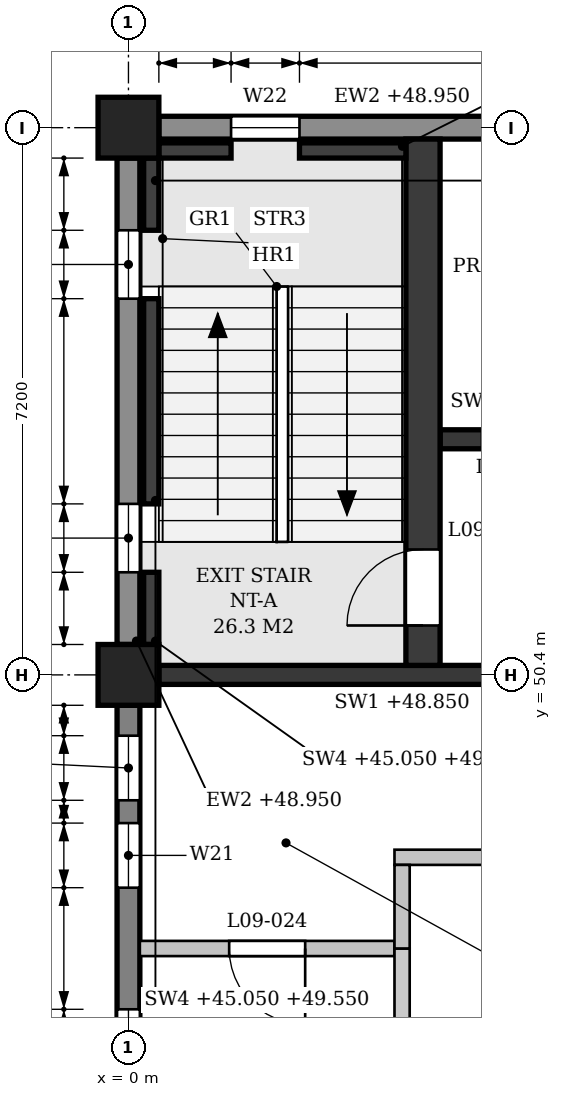
"""IFC4 building model, lengths in metres.
Left out: names, types, materials, properties, quantities, classifications, styles, units other than length and angle.
Written with IfcOpenShell. Run it as: python <this file> out.ifc"""

import sys

from ifc_helpers import new_model, si_unit, direction, frame, frame_2d, origin, origin_2d, place, context, subcontext, project, spatial, polyline, rectangle, outline, extrude, element, fill, save


model = new_model("IFC4")
c1 = context("Model", 3, precision=1e-05, world=origin(), true_north=direction((0.0, 1.0)))
c2 = subcontext(c1, "Body", "Model", "MODEL_VIEW")
j1 = project(units=[si_unit("LENGTHUNIT", "METRE"), si_unit("PLANEANGLEUNIT", "RADIAN")], contexts=[c1])
p1 = place(None, origin())
s1 = spatial("IfcSite", under=j1, at=p1, CompositionType="ELEMENT")
p2 = place(p1, origin())
s2 = spatial("IfcBuilding", under=s1, at=p2, CompositionType="ELEMENT")
p3 = place(p2, frame((0.0, 0.0, 45.3)))
s3 = spatial("IfcBuildingStorey", under=s2, at=p3, CompositionType="ELEMENT", Elevation=45.3)
for number, where, z_axis, x_axis in (
    (1, (0.0, 50.4, 0.0), (0.0, 0.0, 1.0), (1.0, 0.0, 0.0)),
    (2, (0.0, 57.6, 0.0), (0.0, 0.0, 1.0), (1.0, 0.0, 0.0)),
):
    element("IfcColumn", number, at=place(p3, frame(where, z_axis=z_axis, x_axis=x_axis)), inside=s3, PredefinedType="COLUMN", context=c2, shape_type="SweptSolid", body=[
        extrude(rectangle(XDim=0.8, YDim=0.8, at=origin_2d()), origin(), (0.0, 0.0, 1.0), 4.5),
    ])
p4 = place(p3, frame((0.0, 43.6, 0.0), z_axis=(0.0, 0.0, 1.0), x_axis=(0.0, 1.0, 0.0)))
e3 = element("IfcWall", 3, at=p4, inside=s3, PredefinedType="STANDARD", context=c2, shape_type="SweptSolid", body=[
    extrude(rectangle(XDim=6.4, YDim=0.3, at=frame_2d((3.2, 0.0))), origin(), (0.0, 0.0, 1.0), 3.65),
])
p5 = place(p4, frame((0.4, 0.0, 0.9)))
e4 = element("IfcOpeningElement", 4, at=p5, cuts=e3, PredefinedType="OPENING", context=c2, shape_type="SweptSolid", body=[
    extrude(outline(polyline([(0.0, 0.0), (0.85, 0.0), (0.85, 2.25), (0.425, 2.7), (0.0, 2.25), (0.0, 0.0)])), frame((0.0, 0.16, 0.0), z_axis=(0.0, -1.0, 0.0), x_axis=(1.0, 0.0, 0.0)), (0.0, 0.0, 1.0), 0.32),
])
p6 = place(p4, frame((1.55, 0.0, 0.9)))
e5 = element("IfcOpeningElement", 5, at=p6, cuts=e3, PredefinedType="OPENING", context=c2, shape_type="SweptSolid", body=[
    extrude(outline(polyline([(0.0, 0.0), (0.85, 0.0), (0.85, 2.25), (0.425, 2.7), (0.0, 2.25), (0.0, 0.0)])), frame((0.0, 0.16, 0.0), z_axis=(0.0, -1.0, 0.0), x_axis=(1.0, 0.0, 0.0)), (0.0, 0.0, 1.0), 0.32),
])
p7 = place(p4, frame((4.0, 0.0, 0.9)))
e6 = element("IfcOpeningElement", 6, at=p7, cuts=e3, PredefinedType="OPENING", context=c2, shape_type="SweptSolid", body=[
    extrude(outline(polyline([(0.0, 0.0), (0.85, 0.0), (0.85, 2.25), (0.425, 2.7), (0.0, 2.25), (0.0, 0.0)])), frame((0.0, 0.16, 0.0), z_axis=(0.0, -1.0, 0.0), x_axis=(1.0, 0.0, 0.0)), (0.0, 0.0, 1.0), 0.32),
])
p8 = place(p4, frame((5.15, 0.0, 0.9)))
e7 = element("IfcOpeningElement", 7, at=p8, cuts=e3, PredefinedType="OPENING", context=c2, shape_type="SweptSolid", body=[
    extrude(outline(polyline([(0.0, 0.0), (0.85, 0.0), (0.85, 2.25), (0.425, 2.7), (0.0, 2.25), (0.0, 0.0)])), frame((0.0, 0.16, 0.0), z_axis=(0.0, -1.0, 0.0), x_axis=(1.0, 0.0, 0.0)), (0.0, 0.0, 1.0), 0.32),
])
p9 = place(p3, frame((0.0, 50.8, 0.0), z_axis=(0.0, 0.0, 1.0), x_axis=(0.0, 1.0, 0.0)))
e8 = element("IfcWall", 8, at=p9, inside=s3, PredefinedType="STANDARD", context=c2, shape_type="SweptSolid", body=[
    extrude(rectangle(XDim=6.4, YDim=0.3, at=frame_2d((3.2, 0.0))), origin(), (0.0, 0.0, 1.0), 3.65),
])
p10 = place(p9, frame((0.95, 0.0, 0.9)))
e9 = element("IfcOpeningElement", 9, at=p10, cuts=e8, PredefinedType="OPENING", context=c2, shape_type="SweptSolid", body=[
    extrude(outline(polyline([(0.0, 0.0), (0.9, 0.0), (0.9, 2.25), (0.45, 2.7), (0.0, 2.25), (0.0, 0.0)])), frame((0.0, 0.16, 0.0), z_axis=(0.0, -1.0, 0.0), x_axis=(1.0, 0.0, 0.0)), (0.0, 0.0, 1.0), 0.32),
])
p11 = place(p9, frame((4.55, 0.0, 0.9)))
e10 = element("IfcOpeningElement", 10, at=p11, cuts=e8, PredefinedType="OPENING", context=c2, shape_type="SweptSolid", body=[
    extrude(outline(polyline([(0.0, 0.0), (0.9, 0.0), (0.9, 2.25), (0.45, 2.7), (0.0, 2.25), (0.0, 0.0)])), frame((0.0, 0.16, 0.0), z_axis=(0.0, -1.0, 0.0), x_axis=(1.0, 0.0, 0.0)), (0.0, 0.0, 1.0), 0.32),
])
p12 = place(p3, frame((6.8, 57.6, 0.0), z_axis=(0.0, 0.0, 1.0), x_axis=(-1.0, 0.0, 0.0)))
e11 = element("IfcWall", 11, at=p12, inside=s3, PredefinedType="STANDARD", context=c2, shape_type="SweptSolid", body=[
    extrude(rectangle(XDim=6.4, YDim=0.3, at=frame_2d((3.2, 0.0))), origin(), (0.0, 0.0, 1.0), 3.65),
])
p13 = place(p12, frame((4.55, 0.0, 0.9)))
e12 = element("IfcOpeningElement", 12, at=p13, cuts=e11, PredefinedType="OPENING", context=c2, shape_type="SweptSolid", body=[
    extrude(outline(polyline([(0.0, 0.0), (0.9, 0.0), (0.9, 2.25), (0.45, 2.7), (0.0, 2.25), (0.0, 0.0)])), frame((0.0, 0.16, 0.0), z_axis=(0.0, -1.0, 0.0), x_axis=(1.0, 0.0, 0.0)), (0.0, 0.0, 1.0), 0.32),
])
p14 = place(p3, frame((0.4, 50.4, 0.0), z_axis=(0.0, 0.0, 1.0), x_axis=(1.0, 0.0, 0.0)))
e13 = element("IfcWall", 13, at=p14, inside=s3, PredefinedType="SHEAR", context=c2, shape_type="SweptSolid", body=[
    extrude(rectangle(XDim=6.4, YDim=0.25, at=frame_2d((3.2, 0.0))), origin(), (0.0, 0.0, 1.0), 3.55),
])
p15 = place(p14, frame((4.85, 0.0, 0.0)))
e14 = element("IfcOpeningElement", 14, at=p15, cuts=e13, PredefinedType="OPENING", context=c2, shape_type="SweptSolid", body=[
    extrude(rectangle(XDim=1.1, YDim=2.1, at=frame_2d((0.55, 1.05))), frame((0.0, 0.135, 0.0), z_axis=(0.0, -1.0, 0.0), x_axis=(1.0, 0.0, 0.0)), (0.0, 0.0, 1.0), 0.27),
])
p16 = place(p3, frame((0.3, 50.8, -0.25), z_axis=(0.0, 0.0, 1.0), x_axis=(0.0, 1.0, 0.0)))
e15 = element("IfcWall", 15, at=p16, inside=s3, PredefinedType="SHEAR", context=c2, shape_type="SweptSolid", body=[
    extrude(rectangle(XDim=0.95, YDim=0.2, at=frame_2d((0.475, 0.0))), origin(), (0.0, 0.0, 1.0), 4.5),
])
p17 = place(p3, frame((0.3, 52.65, -0.25), z_axis=(0.0, 0.0, 1.0), x_axis=(0.0, 1.0, 0.0)))
e16 = element("IfcWall", 16, at=p17, inside=s3, PredefinedType="SHEAR", context=c2, shape_type="SweptSolid", body=[
    extrude(rectangle(XDim=2.7, YDim=0.2, at=frame_2d((1.35, 0.0))), origin(), (0.0, 0.0, 1.0), 4.5),
])
p18 = place(p3, frame((0.3, 56.25, -0.25), z_axis=(0.0, 0.0, 1.0), x_axis=(0.0, 1.0, 0.0)))
e17 = element("IfcWall", 17, at=p18, inside=s3, PredefinedType="SHEAR", context=c2, shape_type="SweptSolid", body=[
    extrude(rectangle(XDim=0.95, YDim=0.2, at=frame_2d((0.475, 0.0))), origin(), (0.0, 0.0, 1.0), 4.5),
])
p19 = place(p3, frame((0.4, 57.3, -0.25), z_axis=(0.0, 0.0, 1.0), x_axis=(1.0, 0.0, 0.0)))
e18 = element("IfcWall", 18, at=p19, inside=s3, PredefinedType="SHEAR", context=c2, shape_type="SweptSolid", body=[
    extrude(rectangle(XDim=0.95, YDim=0.2, at=frame_2d((0.475, 0.0))), origin(), (0.0, 0.0, 1.0), 4.5),
])
p20 = place(p3, frame((2.25, 57.3, -0.25), z_axis=(0.0, 0.0, 1.0), x_axis=(1.0, 0.0, 0.0)))
e19 = element("IfcWall", 19, at=p20, inside=s3, PredefinedType="SHEAR", context=c2, shape_type="SweptSolid", body=[
    extrude(rectangle(XDim=1.4, YDim=0.2, at=frame_2d((0.7, 0.0))), origin(), (0.0, 0.0, 1.0), 4.5),
])
p21 = place(p3, frame((3.875, 50.525, 0.0), z_axis=(0.0, 0.0, 1.0), x_axis=(0.0, 1.0, 0.0)))
e20 = element("IfcWall", 20, at=p21, inside=s3, PredefinedType="SHEAR", context=c2, shape_type="SweptSolid", body=[
    extrude(rectangle(XDim=6.925, YDim=0.45, at=frame_2d((3.462, 0.0))), origin(), (0.0, 0.0, 1.0), 4.25),
])
p22 = place(p21, frame((0.525, 0.0, 0.0)))
e21 = element("IfcOpeningElement", 21, at=p22, cuts=e20, PredefinedType="OPENING", context=c2, shape_type="SweptSolid", body=[
    extrude(rectangle(XDim=1.0, YDim=2.1, at=frame_2d((0.5, 1.05))), frame((0.0, 0.235, 0.0), z_axis=(0.0, -1.0, 0.0), x_axis=(1.0, 0.0, 0.0)), (0.0, 0.0, 1.0), 0.47),
])
p23 = place(p3, frame((4.1, 53.5, 0.0), z_axis=(0.0, 0.0, 1.0), x_axis=(1.0, 0.0, 0.0)))
e22 = element("IfcWall", 22, at=p23, inside=s3, PredefinedType="SHEAR", context=c2, shape_type="SweptSolid", body=[
    extrude(rectangle(XDim=2.975, YDim=0.25, at=frame_2d((1.487, 0.0))), origin(), (0.0, 0.0, 1.0), 4.25),
])
p24 = place(p23, frame((0.55, 0.0, 0.0)))
e23 = element("IfcOpeningElement", 23, at=p24, cuts=e22, PredefinedType="OPENING", context=c2, shape_type="SweptSolid", body=[
    extrude(rectangle(XDim=0.9, YDim=2.1, at=frame_2d((0.45, 1.05))), frame((0.0, 0.135, 0.0), z_axis=(0.0, -1.0, 0.0), x_axis=(1.0, 0.0, 0.0)), (0.0, 0.0, 1.0), 0.27),
])
p25 = place(p3, frame((0.15, 46.8, 0.0), z_axis=(0.0, 0.0, 1.0), x_axis=(1.0, 0.0, 0.0)))
e24 = element("IfcWall", 24, at=p25, inside=s3, PredefinedType="PARTITIONING", context=c2, shape_type="SweptSolid", body=[
    extrude(outline(polyline([(0.0, 0.0), (3.35, 0.0), (3.35, 4.25), (0.05, 4.25), (0.05, 3.65), (0.0, 3.65), (0.0, 0.0)])), frame((0.0, 0.1, 0.0), z_axis=(0.0, -1.0, 0.0), x_axis=(1.0, 0.0, 0.0)), (0.0, 0.0, 1.0), 0.2),
])
p26 = place(p25, frame((1.175, 0.0, 0.0)))
e25 = element("IfcOpeningElement", 25, at=p26, cuts=e24, PredefinedType="OPENING", context=c2, shape_type="SweptSolid", body=[
    extrude(rectangle(XDim=1.0, YDim=2.1, at=frame_2d((0.5, 1.05))), frame((0.0, 0.11, 0.0), z_axis=(0.0, -1.0, 0.0), x_axis=(1.0, 0.0, 0.0)), (0.0, 0.0, 1.0), 0.22),
])
p27 = place(p3, frame((3.5, 48.0, 0.0), z_axis=(0.0, 0.0, 1.0), x_axis=(1.0, 0.0, 0.0)))
e26 = element("IfcWall", 26, at=p27, inside=s3, PredefinedType="PARTITIONING", context=c2, shape_type="SweptSolid", body=[
    extrude(outline(polyline([(0.0, 0.0), (14.6, 0.0), (14.6, 4.25), (11.125, 4.25), (11.125, 3.55), (10.675, 3.55), (10.675, 4.25), (3.925, 4.25), (3.925, 3.55), (3.475, 3.55), (3.475, 4.25), (0.0, 4.25), (0.0, 0.0)])), frame((0.0, 0.1, 0.0), z_axis=(0.0, -1.0, 0.0), x_axis=(1.0, 0.0, 0.0)), (0.0, 0.0, 1.0), 0.2),
])
p28 = place(p27, frame((1.4, 0.0, 0.0)))
e27 = element("IfcOpeningElement", 27, at=p28, cuts=e26, PredefinedType="OPENING", context=c2, shape_type="SweptSolid", body=[
    extrude(rectangle(XDim=1.0, YDim=2.1, at=frame_2d((0.5, 1.05))), frame((0.0, 0.11, 0.0), z_axis=(0.0, -1.0, 0.0), x_axis=(1.0, 0.0, 0.0)), (0.0, 0.0, 1.0), 0.22),
])
p29 = place(p27, frame((5.0, 0.0, 0.0)))
e28 = element("IfcOpeningElement", 28, at=p29, cuts=e26, PredefinedType="OPENING", context=c2, shape_type="SweptSolid", body=[
    extrude(rectangle(XDim=1.0, YDim=2.1, at=frame_2d((0.5, 1.05))), frame((0.0, 0.11, 0.0), z_axis=(0.0, -1.0, 0.0), x_axis=(1.0, 0.0, 0.0)), (0.0, 0.0, 1.0), 0.22),
])
p30 = place(p3, frame((3.6, 36.15, 0.0), z_axis=(0.0, 0.0, 1.0), x_axis=(0.0, 1.0, 0.0)))
e29 = element("IfcWall", 29, at=p30, inside=s3, PredefinedType="PARTITIONING", context=c2, shape_type="SweptSolid", body=[
    extrude(outline(polyline([(0.0, 0.0), (10.65, 0.0), (10.65, 4.25), (7.275, 4.25), (7.275, 3.55), (6.825, 3.55), (6.825, 4.25), (0.05, 4.25), (0.05, 3.65), (0.0, 3.65), (0.0, 0.0)])), frame((0.0, 0.1, 0.0), z_axis=(0.0, -1.0, 0.0), x_axis=(1.0, 0.0, 0.0)), (0.0, 0.0, 1.0), 0.2),
])
p31 = place(p3, frame((3.6, 46.8, 0.0), z_axis=(0.0, 0.0, 1.0), x_axis=(0.0, 1.0, 0.0)))
e30 = element("IfcWall", 30, at=p31, inside=s3, PredefinedType="PARTITIONING", context=c2, shape_type="SweptSolid", body=[
    extrude(rectangle(XDim=1.1, YDim=0.2, at=frame_2d((0.55, 0.0))), origin(), (0.0, 0.0, 1.0), 4.25),
])
p32 = place(p13, origin())
e31 = element("IfcWindow", 31, at=p32, inside=s3, PartitioningType="SINGLE_PANEL", PredefinedType="WINDOW", context=c2, shape_type="SweptSolid", body=[
    extrude(outline(polyline([(0.0, 0.0), (0.9, 0.0), (0.9, 2.25), (0.45, 2.7), (0.0, 2.25), (0.0, 0.0)])), frame((0.0, 0.03, 0.0), z_axis=(0.0, -1.0, 0.0), x_axis=(1.0, 0.0, 0.0)), (0.0, 0.0, 1.0), 0.06),
])
fill(e12, e31)
p33 = place(p6, origin())
e32 = element("IfcWindow", 32, at=p33, inside=s3, PartitioningType="SINGLE_PANEL", PredefinedType="WINDOW", context=c2, shape_type="SweptSolid", body=[
    extrude(outline(polyline([(0.0, 0.0), (0.85, 0.0), (0.85, 2.25), (0.425, 2.7), (0.0, 2.25), (0.0, 0.0)])), frame((0.0, 0.03, 0.0), z_axis=(0.0, -1.0, 0.0), x_axis=(1.0, 0.0, 0.0)), (0.0, 0.0, 1.0), 0.06),
])
fill(e5, e32)
p34 = place(p7, origin())
e33 = element("IfcWindow", 33, at=p34, inside=s3, PartitioningType="SINGLE_PANEL", PredefinedType="WINDOW", context=c2, shape_type="SweptSolid", body=[
    extrude(outline(polyline([(0.0, 0.0), (0.85, 0.0), (0.85, 2.25), (0.425, 2.7), (0.0, 2.25), (0.0, 0.0)])), frame((0.0, 0.03, 0.0), z_axis=(0.0, -1.0, 0.0), x_axis=(1.0, 0.0, 0.0)), (0.0, 0.0, 1.0), 0.06),
])
fill(e6, e33)
p35 = place(p8, origin())
e34 = element("IfcWindow", 34, at=p35, inside=s3, PartitioningType="SINGLE_PANEL", PredefinedType="WINDOW", context=c2, shape_type="SweptSolid", body=[
    extrude(outline(polyline([(0.0, 0.0), (0.85, 0.0), (0.85, 2.25), (0.425, 2.7), (0.0, 2.25), (0.0, 0.0)])), frame((0.0, 0.03, 0.0), z_axis=(0.0, -1.0, 0.0), x_axis=(1.0, 0.0, 0.0)), (0.0, 0.0, 1.0), 0.06),
])
fill(e7, e34)
p36 = place(p10, origin())
e35 = element("IfcWindow", 35, at=p36, inside=s3, PartitioningType="SINGLE_PANEL", PredefinedType="WINDOW", context=c2, shape_type="SweptSolid", body=[
    extrude(outline(polyline([(0.0, 0.0), (0.9, 0.0), (0.9, 2.25), (0.45, 2.7), (0.0, 2.25), (0.0, 0.0)])), frame((0.0, 0.03, 0.0), z_axis=(0.0, -1.0, 0.0), x_axis=(1.0, 0.0, 0.0)), (0.0, 0.0, 1.0), 0.06),
])
fill(e9, e35)
p37 = place(p11, origin())
e36 = element("IfcWindow", 36, at=p37, inside=s3, PartitioningType="SINGLE_PANEL", PredefinedType="WINDOW", context=c2, shape_type="SweptSolid", body=[
    extrude(outline(polyline([(0.0, 0.0), (0.9, 0.0), (0.9, 2.25), (0.45, 2.7), (0.0, 2.25), (0.0, 0.0)])), frame((0.0, 0.03, 0.0), z_axis=(0.0, -1.0, 0.0), x_axis=(1.0, 0.0, 0.0)), (0.0, 0.0, 1.0), 0.06),
])
fill(e10, e36)
p38 = place(p22, origin())
e37 = element("IfcDoor", 37, at=p38, inside=s3, OperationType="SINGLE_SWING_LEFT", PredefinedType="DOOR", context=c2, shape_type="SweptSolid", body=[
    extrude(rectangle(XDim=1.0, YDim=2.1, at=frame_2d((0.5, 1.05))), frame((0.0, 0.025, 0.0), z_axis=(0.0, -1.0, 0.0), x_axis=(1.0, 0.0, 0.0)), (0.0, 0.0, 1.0), 0.05),
])
fill(e21, e37)
p39 = place(p26, frame((1.0, 0.0, 0.0), z_axis=(0.0, 0.0, 1.0), x_axis=(-1.0, 0.0, 0.0)))
e38 = element("IfcDoor", 38, at=p39, inside=s3, OperationType="SINGLE_SWING_LEFT", PredefinedType="DOOR", context=c2, shape_type="SweptSolid", body=[
    extrude(rectangle(XDim=1.0, YDim=2.1, at=frame_2d((0.5, 1.05))), frame((0.0, 0.025, 0.0), z_axis=(0.0, -1.0, 0.0), x_axis=(1.0, 0.0, 0.0)), (0.0, 0.0, 1.0), 0.05),
])
fill(e25, e38)
save(model, sys.argv[1])
